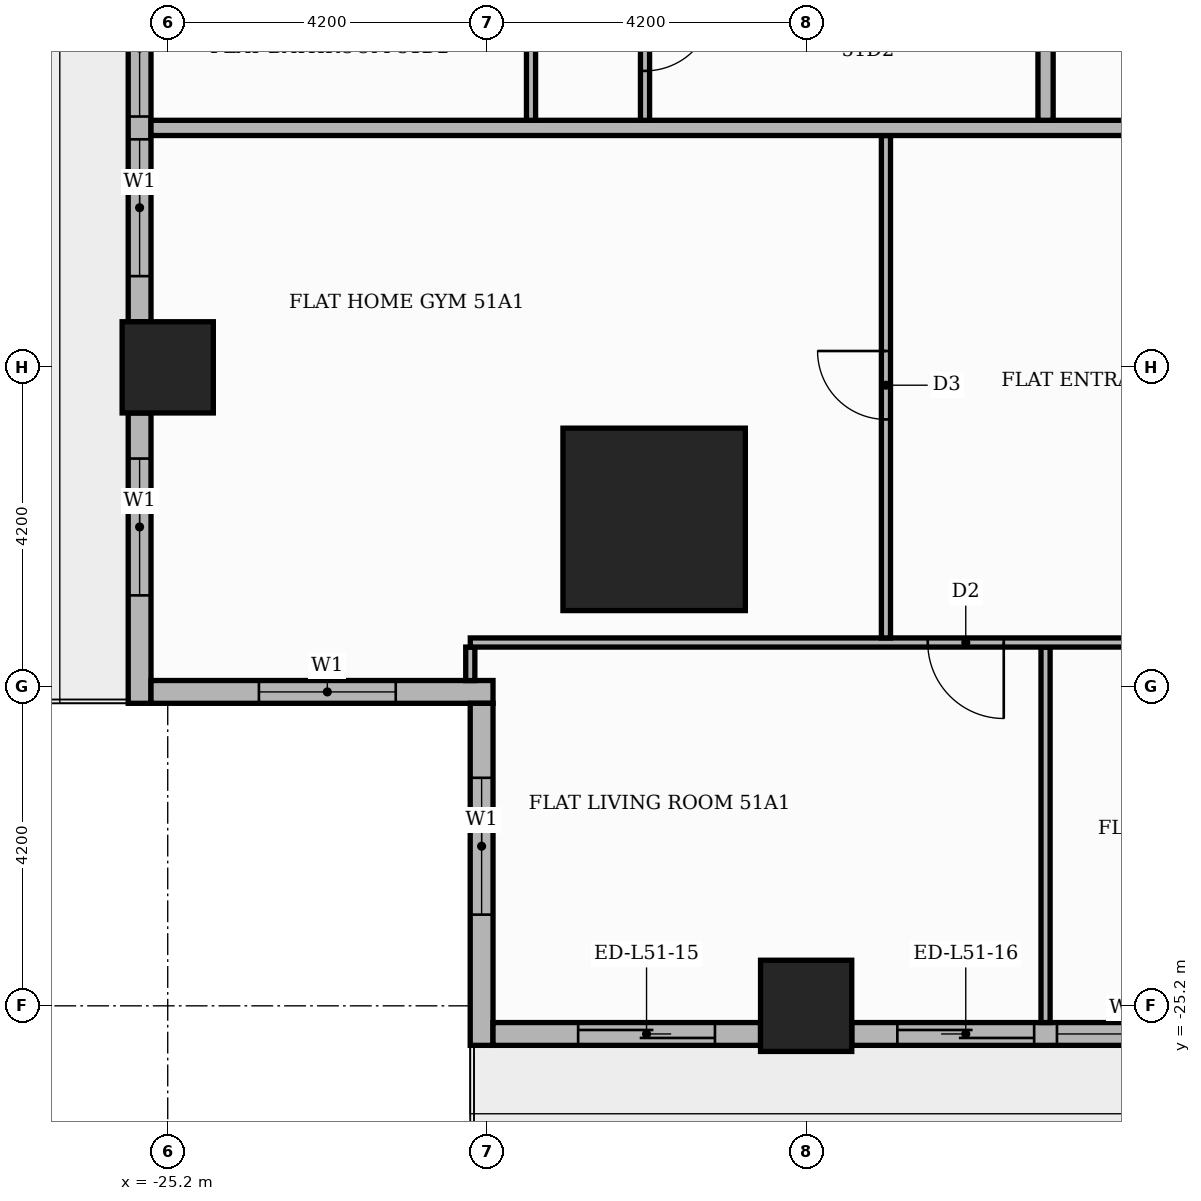
"""IFC4 building model, lengths in metres.
Left out: names, types, materials, properties, quantities, classifications, styles, units other than length and angle.
Written with IfcOpenShell. Run it as: python <this file> out.ifc"""

import sys

from ifc_helpers import new_model, si_unit, direction, frame, frame_2d, origin, origin_2d, place, context, subcontext, project, spatial, rectangle, extrude, element, fill, save


model = new_model("IFC4")
c1 = context("Model", 3, precision=1e-05, world=origin(), true_north=direction((0.0, 1.0)))
c2 = subcontext(c1, "Body", "Model", "MODEL_VIEW")
j1 = project(units=[si_unit("LENGTHUNIT", "METRE"), si_unit("PLANEANGLEUNIT", "RADIAN")], contexts=[c1])
p1 = place(None, origin())
s1 = spatial("IfcSite", under=j1, at=p1, CompositionType="ELEMENT")
p2 = place(p1, origin())
s2 = spatial("IfcBuilding", under=s1, at=p2, CompositionType="ELEMENT")
p3 = place(p2, frame((0.0, 0.0, 215.7)))
s3 = spatial("IfcBuildingStorey", under=s2, at=p3, CompositionType="ELEMENT", Elevation=215.7)
p4 = place(p3, frame((-18.8, -18.8, 0.0), z_axis=(0.0, 0.0, 1.0), x_axis=(1.0, 0.0, 0.0)))
e1 = element("IfcColumn", 1, at=p4, inside=s3, PredefinedType="COLUMN", context=c2, shape_type="SweptSolid", body=[
    extrude(rectangle(XDim=2.4, YDim=2.4, at=origin_2d()), origin(), (0.0, 0.0, 1.0), 3.9),
])
for number, where, z_axis, x_axis in (
    (2, (-16.8, -25.2, 0.0), (0.0, 0.0, 1.0), (1.0, 0.0, 0.0)),
    (3, (-25.2, -16.8, 0.0), (0.0, 0.0, 1.0), (1.0, 0.0, 0.0)),
):
    element("IfcColumn", number, at=place(p3, frame(where, z_axis=z_axis, x_axis=x_axis)), inside=s3, PredefinedType="COLUMN", context=c2, shape_type="SweptSolid", body=[
        extrude(rectangle(XDim=1.2, YDim=1.2, at=origin_2d()), origin(), (0.0, 0.0, 1.0), 3.9),
    ])
p5 = place(p3, frame((-25.57, -9.0, 0.0), z_axis=(0.0, 0.0, 1.0), x_axis=(0.0, -1.0, 0.0)))
e4 = element("IfcWall", 4, at=p5, inside=s3, PredefinedType="STANDARD", context=c2, shape_type="SweptSolid", body=[
    extrude(rectangle(XDim=7.2, YDim=0.3, at=frame_2d((3.6, 0.0))), origin(), (0.0, 0.0, 1.0), 3.48),
])
p6 = place(p5, frame((0.6, 0.0, 0.9)))
e5 = element("IfcOpeningElement", 5, at=p6, cuts=e4, PredefinedType="OPENING", context=c2, shape_type="SweptSolid", body=[
    extrude(rectangle(XDim=1.8, YDim=2.1, at=frame_2d((0.9, 1.05))), frame((0.0, 0.16, 0.0), z_axis=(0.0, -1.0, 0.0), x_axis=(1.0, 0.0, 0.0)), (0.0, 0.0, 1.0), 0.32),
])
p7 = place(p5, frame((2.7, 0.0, 0.9)))
e6 = element("IfcOpeningElement", 6, at=p7, cuts=e4, PredefinedType="OPENING", context=c2, shape_type="SweptSolid", body=[
    extrude(rectangle(XDim=1.8, YDim=2.1, at=frame_2d((0.9, 1.05))), frame((0.0, 0.16, 0.0), z_axis=(0.0, -1.0, 0.0), x_axis=(1.0, 0.0, 0.0)), (0.0, 0.0, 1.0), 0.32),
])
p8 = place(p5, frame((4.8, 0.0, 0.9)))
e7 = element("IfcOpeningElement", 7, at=p8, cuts=e4, PredefinedType="OPENING", context=c2, shape_type="SweptSolid", body=[
    extrude(rectangle(XDim=1.8, YDim=2.1, at=frame_2d((0.9, 1.05))), frame((0.0, 0.16, 0.0), z_axis=(0.0, -1.0, 0.0), x_axis=(1.0, 0.0, 0.0)), (0.0, 0.0, 1.0), 0.32),
])
p9 = place(p3, frame((-25.57, -17.4, 0.0), z_axis=(0.0, 0.0, 1.0), x_axis=(0.0, -1.0, 0.0)))
e8 = element("IfcWall", 8, at=p9, inside=s3, PredefinedType="STANDARD", context=c2, shape_type="SweptSolid", body=[
    extrude(rectangle(XDim=3.82, YDim=0.3, at=frame_2d((1.91, 0.0))), origin(), (0.0, 0.0, 1.0), 3.48),
])
p10 = place(p9, frame((0.6, 0.0, 0.9)))
e9 = element("IfcOpeningElement", 9, at=p10, cuts=e8, PredefinedType="OPENING", context=c2, shape_type="SweptSolid", body=[
    extrude(rectangle(XDim=1.8, YDim=2.1, at=frame_2d((0.9, 1.05))), frame((0.0, 0.16, 0.0), z_axis=(0.0, -1.0, 0.0), x_axis=(1.0, 0.0, 0.0)), (0.0, 0.0, 1.0), 0.32),
])
p11 = place(p3, frame((-25.42, -21.07, 0.0), z_axis=(0.0, 0.0, 1.0), x_axis=(1.0, 0.0, 0.0)))
e10 = element("IfcWall", 10, at=p11, inside=s3, PredefinedType="STANDARD", context=c2, shape_type="SweptSolid", body=[
    extrude(rectangle(XDim=4.5, YDim=0.3, at=frame_2d((2.25, 0.0))), origin(), (0.0, 0.0, 1.0), 3.48),
])
p12 = place(p11, frame((1.42, 0.0, 0.9)))
e11 = element("IfcOpeningElement", 11, at=p12, cuts=e10, PredefinedType="OPENING", context=c2, shape_type="SweptSolid", body=[
    extrude(rectangle(XDim=1.8, YDim=2.1, at=frame_2d((0.9, 1.05))), frame((0.0, 0.16, 0.0), z_axis=(0.0, -1.0, 0.0), x_axis=(1.0, 0.0, 0.0)), (0.0, 0.0, 1.0), 0.32),
])
p13 = place(p3, frame((-21.07, -21.22, 0.0), z_axis=(0.0, 0.0, 1.0), x_axis=(0.0, -1.0, 0.0)))
e12 = element("IfcWall", 12, at=p13, inside=s3, PredefinedType="STANDARD", context=c2, shape_type="SweptSolid", body=[
    extrude(rectangle(XDim=4.5, YDim=0.3, at=frame_2d((2.25, 0.0))), origin(), (0.0, 0.0, 1.0), 3.48),
])
p14 = place(p13, frame((0.98, 0.0, 0.9)))
e13 = element("IfcOpeningElement", 13, at=p14, cuts=e12, PredefinedType="OPENING", context=c2, shape_type="SweptSolid", body=[
    extrude(rectangle(XDim=1.8, YDim=2.1, at=frame_2d((0.9, 1.05))), frame((0.0, 0.16, 0.0), z_axis=(0.0, -1.0, 0.0), x_axis=(1.0, 0.0, 0.0)), (0.0, 0.0, 1.0), 0.32),
])
p15 = place(p3, frame((-20.92, -25.57, 0.0), z_axis=(0.0, 0.0, 1.0), x_axis=(1.0, 0.0, 0.0)))
e14 = element("IfcWall", 14, at=p15, inside=s3, PredefinedType="STANDARD", context=c2, shape_type="SweptSolid", body=[
    extrude(rectangle(XDim=3.52, YDim=0.3, at=frame_2d((1.76, 0.0))), origin(), (0.0, 0.0, 1.0), 3.48),
])
p16 = place(p15, frame((1.12, 0.0, 0.0)))
e15 = element("IfcOpeningElement", 15, at=p16, cuts=e14, PredefinedType="OPENING", context=c2, shape_type="SweptSolid", body=[
    extrude(rectangle(XDim=1.8, YDim=2.4, at=frame_2d((0.9, 1.2))), frame((0.0, 0.16, 0.0), z_axis=(0.0, -1.0, 0.0), x_axis=(1.0, 0.0, 0.0)), (0.0, 0.0, 1.0), 0.32),
])
p17 = place(p3, frame((-16.2, -25.57, 0.0), z_axis=(0.0, 0.0, 1.0), x_axis=(1.0, 0.0, 0.0)))
e16 = element("IfcWall", 16, at=p17, inside=s3, PredefinedType="STANDARD", context=c2, shape_type="SweptSolid", body=[
    extrude(rectangle(XDim=7.2, YDim=0.3, at=frame_2d((3.6, 0.0))), origin(), (0.0, 0.0, 1.0), 3.48),
])
p18 = place(p17, frame((0.6, 0.0, 0.0)))
e17 = element("IfcOpeningElement", 17, at=p18, cuts=e16, PredefinedType="OPENING", context=c2, shape_type="SweptSolid", body=[
    extrude(rectangle(XDim=1.8, YDim=2.4, at=frame_2d((0.9, 1.2))), frame((0.0, 0.16, 0.0), z_axis=(0.0, -1.0, 0.0), x_axis=(1.0, 0.0, 0.0)), (0.0, 0.0, 1.0), 0.32),
])
p19 = place(p17, frame((2.7, 0.0, 0.9)))
e18 = element("IfcOpeningElement", 18, at=p19, cuts=e16, PredefinedType="OPENING", context=c2, shape_type="SweptSolid", body=[
    extrude(rectangle(XDim=1.8, YDim=2.1, at=frame_2d((0.9, 1.05))), frame((0.0, 0.16, 0.0), z_axis=(0.0, -1.0, 0.0), x_axis=(1.0, 0.0, 0.0)), (0.0, 0.0, 1.0), 0.32),
])
p20 = place(p17, frame((4.8, 0.0, 0.0)))
e19 = element("IfcOpeningElement", 19, at=p20, cuts=e16, PredefinedType="OPENING", context=c2, shape_type="SweptSolid", body=[
    extrude(rectangle(XDim=1.8, YDim=2.4, at=frame_2d((0.9, 1.2))), frame((0.0, 0.16, 0.0), z_axis=(0.0, -1.0, 0.0), x_axis=(1.0, 0.0, 0.0)), (0.0, 0.0, 1.0), 0.32),
])
p21 = place(p3, frame((-13.65, -25.42, 0.0), z_axis=(0.0, 0.0, 1.0), x_axis=(0.0, 1.0, 0.0)))
e20 = element("IfcWall", 20, at=p21, inside=s3, PredefinedType="PARTITIONING", context=c2, shape_type="SweptSolid", body=[
    extrude(rectangle(XDim=4.94, YDim=0.12, at=frame_2d((2.47, 0.0))), origin(), (0.0, 0.0, 1.0), 3.48),
])
p22 = place(p3, frame((-21.219, -20.921, 0.0), z_axis=(0.0, 0.0, 1.0), x_axis=(0.0, 1.0, 0.0)))
e21 = element("IfcWall", 21, at=p22, inside=s3, PredefinedType="PARTITIONING", context=c2, shape_type="SweptSolid", body=[
    extrude(rectangle(XDim=0.441, YDim=0.12, at=frame_2d((0.22, 0.0))), origin(), (0.0, 0.0, 1.0), 3.48),
])
p23 = place(p3, frame((-21.219, -20.42, 0.0), z_axis=(0.0, 0.0, 1.0), x_axis=(1.0, 0.0, 0.0)))
e22 = element("IfcWall", 22, at=p23, inside=s3, PredefinedType="PARTITIONING", context=c2, shape_type="SweptSolid", body=[
    extrude(rectangle(XDim=34.769, YDim=0.12, at=frame_2d((17.385, 0.0))), origin(), (0.0, 0.0, 1.0), 3.48),
])
p24 = place(p23, frame((6.019, 0.0, 0.0)))
e23 = element("IfcOpeningElement", 23, at=p24, cuts=e22, PredefinedType="OPENING", context=c2, shape_type="SweptSolid", body=[
    extrude(rectangle(XDim=1.0, YDim=2.1, at=frame_2d((0.5, 1.05))), frame((0.0, 0.07, 0.0), z_axis=(0.0, -1.0, 0.0), x_axis=(1.0, 0.0, 0.0)), (0.0, 0.0, 1.0), 0.14),
])
p25 = place(p23, frame((11.269, 0.0, 0.0)))
e24 = element("IfcOpeningElement", 24, at=p25, cuts=e22, PredefinedType="OPENING", context=c2, shape_type="SweptSolid", body=[
    extrude(rectangle(XDim=1.0, YDim=2.1, at=frame_2d((0.5, 1.05))), frame((0.0, 0.07, 0.0), z_axis=(0.0, -1.0, 0.0), x_axis=(1.0, 0.0, 0.0)), (0.0, 0.0, 1.0), 0.14),
])
p26 = place(p23, frame((19.719, 0.0, 0.0)))
e25 = element("IfcOpeningElement", 25, at=p26, cuts=e22, PredefinedType="OPENING", context=c2, shape_type="SweptSolid", body=[
    extrude(rectangle(XDim=0.9, YDim=2.1, at=frame_2d((0.45, 1.05))), frame((0.0, 0.07, 0.0), z_axis=(0.0, -1.0, 0.0), x_axis=(1.0, 0.0, 0.0)), (0.0, 0.0, 1.0), 0.14),
])
p27 = place(p23, frame((30.219, 0.0, 0.0)))
e26 = element("IfcOpeningElement", 26, at=p27, cuts=e22, PredefinedType="OPENING", context=c2, shape_type="SweptSolid", body=[
    extrude(rectangle(XDim=0.9, YDim=2.1, at=frame_2d((0.45, 1.05))), frame((0.0, 0.07, 0.0), z_axis=(0.0, -1.0, 0.0), x_axis=(1.0, 0.0, 0.0)), (0.0, 0.0, 1.0), 0.14),
])
p28 = place(p3, frame((-15.75, -20.36, 0.0), z_axis=(0.0, 0.0, 1.0), x_axis=(0.0, 1.0, 0.0)))
e27 = element("IfcWall", 27, at=p28, inside=s3, PredefinedType="PARTITIONING", context=c2, shape_type="SweptSolid", body=[
    extrude(rectangle(XDim=6.61, YDim=0.12, at=frame_2d((3.305, 0.0))), origin(), (0.0, 0.0, 1.0), 3.48),
])
p29 = place(p28, frame((2.875, 0.0, 0.0)))
e28 = element("IfcOpeningElement", 28, at=p29, cuts=e27, PredefinedType="OPENING", context=c2, shape_type="SweptSolid", body=[
    extrude(rectangle(XDim=0.9, YDim=2.1, at=frame_2d((0.45, 1.05))), frame((0.0, 0.07, 0.0), z_axis=(0.0, -1.0, 0.0), x_axis=(1.0, 0.0, 0.0)), (0.0, 0.0, 1.0), 0.14),
])
p30 = place(p3, frame((-25.42, -13.65, 0.0), z_axis=(0.0, 0.0, 1.0), x_axis=(1.0, 0.0, 0.0)))
e29 = element("IfcWall", 29, at=p30, inside=s3, PredefinedType="PARTITIONING", context=c2, shape_type="SweptSolid", body=[
    extrude(rectangle(XDim=39.07, YDim=0.2, at=frame_2d((19.535, 0.0))), origin(), (0.0, 0.0, 1.0), 3.48),
])
p31 = place(p30, frame((13.32, 0.0, 0.0)))
e30 = element("IfcOpeningElement", 30, at=p31, cuts=e29, PredefinedType="OPENING", context=c2, shape_type="SweptSolid", body=[
    extrude(rectangle(XDim=1.1, YDim=2.4, at=frame_2d((0.55, 1.2))), frame((0.0, 0.11, 0.0), z_axis=(0.0, -1.0, 0.0), x_axis=(1.0, 0.0, 0.0)), (0.0, 0.0, 1.0), 0.22),
])
p32 = place(p3, frame((-20.42, -13.55, 0.0), z_axis=(0.0, 0.0, 1.0), x_axis=(0.0, 1.0, 0.0)))
e31 = element("IfcWall", 31, at=p32, inside=s3, PredefinedType="PARTITIONING", context=c2, shape_type="SweptSolid", body=[
    extrude(rectangle(XDim=1.94, YDim=0.12, at=frame_2d((0.97, 0.0))), origin(), (0.0, 0.0, 1.0), 3.48),
])
p33 = place(p3, frame((-18.92, -13.55, 0.0), z_axis=(0.0, 0.0, 1.0), x_axis=(0.0, 1.0, 0.0)))
e32 = element("IfcWall", 32, at=p33, inside=s3, PredefinedType="PARTITIONING", context=c2, shape_type="SweptSolid", body=[
    extrude(rectangle(XDim=2.24, YDim=0.12, at=frame_2d((1.12, 0.0))), origin(), (0.0, 0.0, 1.0), 3.48),
])
p34 = place(p33, frame((0.65, 0.0, 0.0)))
e33 = element("IfcOpeningElement", 33, at=p34, cuts=e32, PredefinedType="OPENING", context=c2, shape_type="SweptSolid", body=[
    extrude(rectangle(XDim=0.9, YDim=2.1, at=frame_2d((0.45, 1.05))), frame((0.0, 0.07, 0.0), z_axis=(0.0, -1.0, 0.0), x_axis=(1.0, 0.0, 0.0)), (0.0, 0.0, 1.0), 0.14),
])
p35 = place(p3, frame((-13.65, -13.55, 0.0), z_axis=(0.0, 0.0, 1.0), x_axis=(0.0, 1.0, 0.0)))
e34 = element("IfcWall", 34, at=p35, inside=s3, PredefinedType="PARTITIONING", context=c2, shape_type="SweptSolid", body=[
    extrude(rectangle(XDim=18.7, YDim=0.2, at=frame_2d((9.35, 0.0))), origin(), (0.0, 0.0, 1.0), 3.48),
])
p36 = place(p35, frame((11.95, 0.0, 0.0)))
e35 = element("IfcOpeningElement", 35, at=p36, cuts=e34, PredefinedType="OPENING", context=c2, shape_type="SweptSolid", body=[
    extrude(rectangle(XDim=1.1, YDim=2.4, at=frame_2d((0.55, 1.2))), frame((0.0, 0.11, 0.0), z_axis=(0.0, -1.0, 0.0), x_axis=(1.0, 0.0, 0.0)), (0.0, 0.0, 1.0), 0.22),
])
p37 = place(p7, origin())
e36 = element("IfcWindow", 36, at=p37, inside=s3, PartitioningType="SINGLE_PANEL", PredefinedType="WINDOW", context=c2, shape_type="SweptSolid", body=[
    extrude(rectangle(XDim=1.8, YDim=2.1, at=frame_2d((0.9, 1.05))), frame((0.0, 0.03, 0.0), z_axis=(0.0, -1.0, 0.0), x_axis=(1.0, 0.0, 0.0)), (0.0, 0.0, 1.0), 0.06),
])
fill(e6, e36)
p38 = place(p8, origin())
e37 = element("IfcWindow", 37, at=p38, inside=s3, PartitioningType="SINGLE_PANEL", PredefinedType="WINDOW", context=c2, shape_type="SweptSolid", body=[
    extrude(rectangle(XDim=1.8, YDim=2.1, at=frame_2d((0.9, 1.05))), frame((0.0, 0.03, 0.0), z_axis=(0.0, -1.0, 0.0), x_axis=(1.0, 0.0, 0.0)), (0.0, 0.0, 1.0), 0.06),
])
fill(e7, e37)
p39 = place(p10, origin())
e38 = element("IfcWindow", 38, at=p39, inside=s3, PartitioningType="SINGLE_PANEL", PredefinedType="WINDOW", context=c2, shape_type="SweptSolid", body=[
    extrude(rectangle(XDim=1.8, YDim=2.1, at=frame_2d((0.9, 1.05))), frame((0.0, 0.03, 0.0), z_axis=(0.0, -1.0, 0.0), x_axis=(1.0, 0.0, 0.0)), (0.0, 0.0, 1.0), 0.06),
])
fill(e9, e38)
p40 = place(p12, origin())
e39 = element("IfcWindow", 39, at=p40, inside=s3, PartitioningType="SINGLE_PANEL", PredefinedType="WINDOW", context=c2, shape_type="SweptSolid", body=[
    extrude(rectangle(XDim=1.8, YDim=2.1, at=frame_2d((0.9, 1.05))), frame((0.0, 0.03, 0.0), z_axis=(0.0, -1.0, 0.0), x_axis=(1.0, 0.0, 0.0)), (0.0, 0.0, 1.0), 0.06),
])
fill(e11, e39)
p41 = place(p14, origin())
e40 = element("IfcWindow", 40, at=p41, inside=s3, PartitioningType="SINGLE_PANEL", PredefinedType="WINDOW", context=c2, shape_type="SweptSolid", body=[
    extrude(rectangle(XDim=1.8, YDim=2.1, at=frame_2d((0.9, 1.05))), frame((0.0, 0.03, 0.0), z_axis=(0.0, -1.0, 0.0), x_axis=(1.0, 0.0, 0.0)), (0.0, 0.0, 1.0), 0.06),
])
fill(e13, e40)
p42 = place(p16, origin())
e41 = element("IfcDoor", 41, at=p42, inside=s3, OperationType="SLIDING_TO_RIGHT", PredefinedType="DOOR", context=c2, shape_type="SweptSolid", body=[
    extrude(rectangle(XDim=1.8, YDim=2.4, at=frame_2d((0.9, 1.2))), frame((0.0, 0.025, 0.0), z_axis=(0.0, -1.0, 0.0), x_axis=(1.0, 0.0, 0.0)), (0.0, 0.0, 1.0), 0.05),
])
fill(e15, e41)
p43 = place(p18, origin())
e42 = element("IfcDoor", 42, at=p43, inside=s3, OperationType="SLIDING_TO_LEFT", PredefinedType="DOOR", context=c2, shape_type="SweptSolid", body=[
    extrude(rectangle(XDim=1.8, YDim=2.4, at=frame_2d((0.9, 1.2))), frame((0.0, 0.025, 0.0), z_axis=(0.0, -1.0, 0.0), x_axis=(1.0, 0.0, 0.0)), (0.0, 0.0, 1.0), 0.05),
])
fill(e17, e42)
p44 = place(p19, origin())
e43 = element("IfcWindow", 43, at=p44, inside=s3, PartitioningType="SINGLE_PANEL", PredefinedType="WINDOW", context=c2, shape_type="SweptSolid", body=[
    extrude(rectangle(XDim=1.8, YDim=2.1, at=frame_2d((0.9, 1.05))), frame((0.0, 0.03, 0.0), z_axis=(0.0, -1.0, 0.0), x_axis=(1.0, 0.0, 0.0)), (0.0, 0.0, 1.0), 0.06),
])
fill(e18, e43)
p45 = place(p29, origin())
e44 = element("IfcDoor", 44, at=p45, inside=s3, OperationType="SINGLE_SWING_RIGHT", PredefinedType="DOOR", context=c2, shape_type="SweptSolid", body=[
    extrude(rectangle(XDim=0.9, YDim=2.1, at=frame_2d((0.45, 1.05))), frame((0.0, 0.025, 0.0), z_axis=(0.0, -1.0, 0.0), x_axis=(1.0, 0.0, 0.0)), (0.0, 0.0, 1.0), 0.05),
])
fill(e28, e44)
p46 = place(p24, frame((1.0, 0.0, 0.0), z_axis=(0.0, 0.0, 1.0), x_axis=(-1.0, 0.0, 0.0)))
e45 = element("IfcDoor", 45, at=p46, inside=s3, OperationType="SINGLE_SWING_RIGHT", PredefinedType="DOOR", context=c2, shape_type="SweptSolid", body=[
    extrude(rectangle(XDim=1.0, YDim=2.1, at=frame_2d((0.5, 1.05))), frame((0.0, 0.025, 0.0), z_axis=(0.0, -1.0, 0.0), x_axis=(1.0, 0.0, 0.0)), (0.0, 0.0, 1.0), 0.05),
])
fill(e23, e45)
p47 = place(p34, frame((0.9, 0.0, 0.0), z_axis=(0.0, 0.0, 1.0), x_axis=(-1.0, 0.0, 0.0)))
e46 = element("IfcDoor", 46, at=p47, inside=s3, OperationType="SINGLE_SWING_RIGHT", PredefinedType="DOOR", context=c2, shape_type="SweptSolid", body=[
    extrude(rectangle(XDim=0.9, YDim=2.1, at=frame_2d((0.45, 1.05))), frame((0.0, 0.025, 0.0), z_axis=(0.0, -1.0, 0.0), x_axis=(1.0, 0.0, 0.0)), (0.0, 0.0, 1.0), 0.05),
])
fill(e33, e46)
save(model, sys.argv[1])
